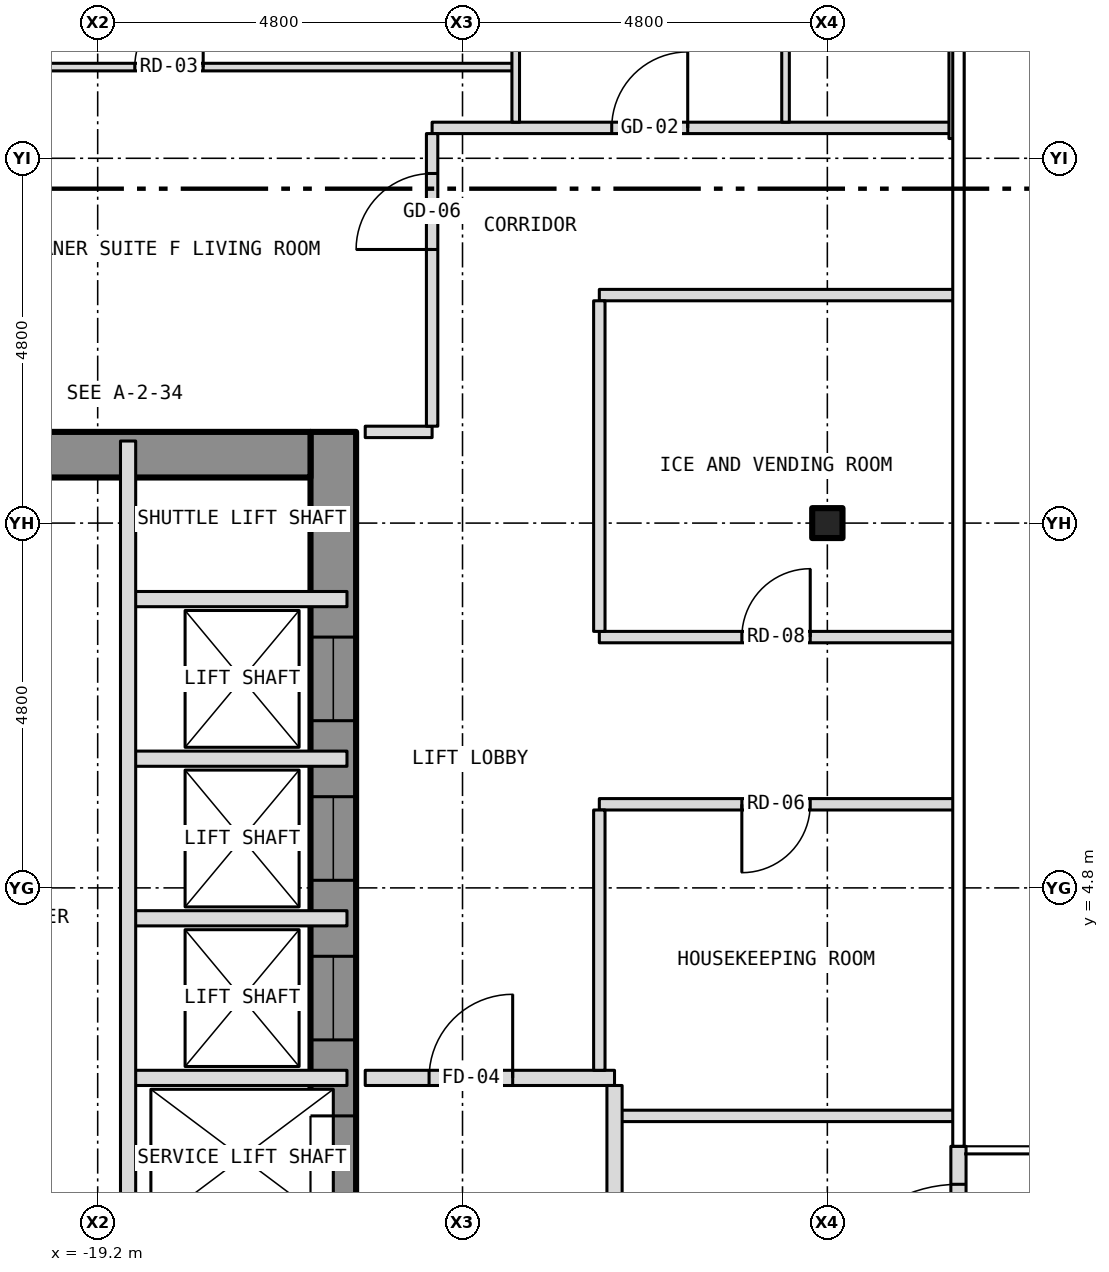
"""IFC4 building model, lengths in metres.
Left out: names, types, materials, properties, quantities, classifications, styles, units other than length and angle.
Written with IfcOpenShell. Run it as: python <this file> out.ifc"""

import sys

from ifc_helpers import new_model, si_unit, direction, frame, frame_2d, origin, origin_2d, place, context, subcontext, project, spatial, rectangle, i_section, extrude, element, fill, save


model = new_model("IFC4")
c1 = context("Model", 3, precision=1e-05, world=origin(), true_north=direction((0.0, 1.0)))
c2 = subcontext(c1, "Body", "Model", "MODEL_VIEW")
j1 = project(units=[si_unit("LENGTHUNIT", "METRE"), si_unit("PLANEANGLEUNIT", "RADIAN")], contexts=[c1])
p1 = place(None, origin())
s1 = spatial("IfcSite", under=j1, at=p1, CompositionType="ELEMENT")
p2 = place(p1, origin())
s2 = spatial("IfcBuilding", under=s1, at=p2, CompositionType="ELEMENT")
p3 = place(p2, frame((0.0, 0.0, 124.0)))
s3 = spatial("IfcBuildingStorey", under=s2, at=p3, CompositionType="ELEMENT", Elevation=124.0)
p4 = place(p3, frame((-9.6, 9.6, -0.15), z_axis=(0.0, 0.0, 1.0), x_axis=(1.0, 0.0, 0.0)))
e1 = element("IfcColumn", 1, at=p4, inside=s3, PredefinedType="COLUMN", context=c2, shape_type="SweptSolid", body=[
    extrude(i_section(OverallWidth=0.399, OverallDepth=0.394, WebThickness=0.023, FlangeThickness=0.037, at=origin_2d()), origin(), (0.0, 0.0, 1.0), 3.5),
])
p5 = place(p3, frame((-16.1, -10.8, 0.0), z_axis=(0.0, 0.0, 1.0), x_axis=(0.0, 1.0, 0.0)))
e2 = element("IfcWall", 2, at=p5, inside=s3, PredefinedType="SHEAR", context=c2, shape_type="SweptSolid", body=[
    extrude(rectangle(XDim=21.6, YDim=0.6, at=frame_2d((10.8, 0.0))), origin(), (0.0, 0.0, 1.0), 3.25),
])
p6 = place(p5, frame((9.4, 0.0, 0.0)))
e3 = element("IfcOpeningElement", 3, at=p6, cuts=e2, PredefinedType="OPENING", context=c2, shape_type="SweptSolid", body=[
    extrude(rectangle(XDim=1.1, YDim=2.1, at=frame_2d((0.55, 1.05))), frame((0.0, 0.312, 0.0), z_axis=(0.0, -1.0, 0.0), x_axis=(1.0, 0.0, 0.0)), (0.0, 0.0, 1.0), 0.624),
])
p7 = place(p5, frame((11.5, 0.0, 0.0)))
e4 = element("IfcOpeningElement", 4, at=p7, cuts=e2, PredefinedType="OPENING", context=c2, shape_type="SweptSolid", body=[
    extrude(rectangle(XDim=1.1, YDim=2.1, at=frame_2d((0.55, 1.05))), frame((0.0, 0.312, 0.0), z_axis=(0.0, -1.0, 0.0), x_axis=(1.0, 0.0, 0.0)), (0.0, 0.0, 1.0), 0.624),
])
p8 = place(p5, frame((13.6, 0.0, 0.0)))
e5 = element("IfcOpeningElement", 5, at=p8, cuts=e2, PredefinedType="OPENING", context=c2, shape_type="SweptSolid", body=[
    extrude(rectangle(XDim=1.1, YDim=2.1, at=frame_2d((0.55, 1.05))), frame((0.0, 0.312, 0.0), z_axis=(0.0, -1.0, 0.0), x_axis=(1.0, 0.0, 0.0)), (0.0, 0.0, 1.0), 0.624),
])
p9 = place(p5, frame((15.7, 0.0, 0.0)))
e6 = element("IfcOpeningElement", 6, at=p9, cuts=e2, PredefinedType="OPENING", context=c2, shape_type="SweptSolid", body=[
    extrude(rectangle(XDim=1.1, YDim=2.1, at=frame_2d((0.55, 1.05))), frame((0.0, 0.312, 0.0), z_axis=(0.0, -1.0, 0.0), x_axis=(1.0, 0.0, 0.0)), (0.0, 0.0, 1.0), 0.624),
])
p10 = place(p5, frame((17.8, 0.0, 0.0)))
e7 = element("IfcOpeningElement", 7, at=p10, cuts=e2, PredefinedType="OPENING", context=c2, shape_type="SweptSolid", body=[
    extrude(rectangle(XDim=1.1, YDim=2.1, at=frame_2d((0.55, 1.05))), frame((0.0, 0.312, 0.0), z_axis=(0.0, -1.0, 0.0), x_axis=(1.0, 0.0, 0.0)), (0.0, 0.0, 1.0), 0.624),
])
p11 = place(p5, frame((0.758, 0.0, 0.0)))
e8 = element("IfcOpeningElement", 8, at=p11, cuts=e2, PredefinedType="OPENING", context=c2, shape_type="SweptSolid", body=[
    extrude(rectangle(XDim=1.1, YDim=2.1, at=frame_2d((0.55, 1.05))), frame((0.0, 0.312, 0.0), z_axis=(0.0, -1.0, 0.0), x_axis=(1.0, 0.0, 0.0)), (0.0, 0.0, 1.0), 0.624),
])
p12 = place(p5, frame((7.5, 0.0, 0.0)))
e9 = element("IfcOpeningElement", 9, at=p12, cuts=e2, PredefinedType="OPENING", context=c2, shape_type="SweptSolid", body=[
    extrude(rectangle(XDim=1.1, YDim=2.1, at=frame_2d((0.55, 1.05))), frame((0.0, 0.312, 0.0), z_axis=(0.0, -1.0, 0.0), x_axis=(1.0, 0.0, 0.0)), (0.0, 0.0, 1.0), 0.624),
])
p13 = place(p3, frame((-22.2, 10.5, 0.0), z_axis=(0.0, 0.0, 1.0), x_axis=(1.0, 0.0, 0.0)))
e10 = element("IfcWall", 10, at=p13, inside=s3, PredefinedType="SHEAR", context=c2, shape_type="SweptSolid", body=[
    extrude(rectangle(XDim=5.8, YDim=0.6, at=frame_2d((2.9, 0.0))), origin(), (0.0, 0.0, 1.0), 3.25),
])
p14 = place(p3, frame((-7.875, -1.4, 0.0), z_axis=(0.0, 0.0, 1.0), x_axis=(0.0, 1.0, 0.0)))
e11 = element("IfcWall", 11, at=p14, inside=s3, PredefinedType="SOLIDWALL", context=c2, shape_type="SweptSolid", body=[
    extrude(rectangle(XDim=2.8, YDim=0.2, at=frame_2d((1.4, 0.0))), origin(), (0.0, 0.0, 1.0), 3.5),
])
p15 = place(p14, frame((0.5, 0.0, 0.0)))
e12 = element("IfcOpeningElement", 12, at=p15, cuts=e11, PredefinedType="OPENING", context=c2, shape_type="SweptSolid", body=[
    extrude(rectangle(XDim=1.8, YDim=2.1, at=frame_2d((0.9, 1.05))), frame((0.0, 0.112, 0.0), z_axis=(0.0, -1.0, 0.0), x_axis=(1.0, 0.0, 0.0)), (0.0, 0.0, 1.0), 0.224),
])
p16 = place(p3, frame((-12.4, 1.8, 0.0), z_axis=(0.0, 0.0, 1.0), x_axis=(1.0, 0.0, 0.0)))
e13 = element("IfcWall", 13, at=p16, inside=s3, PredefinedType="PARTITIONING", context=c2, shape_type="SweptSolid", body=[
    extrude(rectangle(XDim=4.48, YDim=0.15, at=frame_2d((2.24, 0.0))), origin(), (0.0, 0.0, 1.0), 3.35),
])
p17 = place(p3, frame((-18.8, 2.3, 0.0), z_axis=(0.0, 0.0, 1.0), x_axis=(1.0, 0.0, 0.0)))
e14 = element("IfcWall", 14, at=p17, inside=s3, PredefinedType="PARTITIONING", context=c2, shape_type="SweptSolid", body=[
    extrude(rectangle(XDim=2.88, YDim=0.2, at=frame_2d((1.44, 0.0))), origin(), (0.0, 0.0, 1.0), 3.25),
])
p18 = place(p3, frame((-15.68, 2.3, 0.0), z_axis=(0.0, 0.0, 1.0), x_axis=(1.0, 0.0, 0.0)))
e15 = element("IfcWall", 15, at=p18, inside=s3, PredefinedType="PARTITIONING", context=c2, shape_type="SweptSolid", body=[
    extrude(rectangle(XDim=3.28, YDim=0.2, at=frame_2d((1.64, 0.0))), origin(), (0.0, 0.0, 1.0), 3.35),
])
p19 = place(p18, frame((0.84, 0.0, 0.0)))
e16 = element("IfcOpeningElement", 16, at=p19, cuts=e15, PredefinedType="OPENING", context=c2, shape_type="SweptSolid", body=[
    extrude(rectangle(XDim=1.1, YDim=2.1, at=frame_2d((0.55, 1.05))), frame((0.0, 0.112, 0.0), z_axis=(0.0, -1.0, 0.0), x_axis=(1.0, 0.0, 0.0)), (0.0, 0.0, 1.0), 0.224),
])
p20 = place(p3, frame((-18.8, 4.4, 0.0), z_axis=(0.0, 0.0, 1.0), x_axis=(1.0, 0.0, 0.0)))
e17 = element("IfcWall", 17, at=p20, inside=s3, PredefinedType="PARTITIONING", context=c2, shape_type="SweptSolid", body=[
    extrude(rectangle(XDim=2.88, YDim=0.2, at=frame_2d((1.44, 0.0))), origin(), (0.0, 0.0, 1.0), 3.25),
])
p21 = place(p3, frame((-12.6, 5.9, 0.0), z_axis=(0.0, 0.0, 1.0), x_axis=(1.0, 0.0, 0.0)))
e18 = element("IfcWall", 18, at=p21, inside=s3, PredefinedType="PARTITIONING", context=c2, shape_type="SweptSolid", body=[
    extrude(rectangle(XDim=4.68, YDim=0.15, at=frame_2d((2.34, 0.0))), origin(), (0.0, 0.0, 1.0), 3.35),
])
p22 = place(p21, frame((1.875, 0.0, 0.0)))
e19 = element("IfcOpeningElement", 19, at=p22, cuts=e18, PredefinedType="OPENING", context=c2, shape_type="SweptSolid", body=[
    extrude(rectangle(XDim=0.9, YDim=2.1, at=frame_2d((0.45, 1.05))), frame((0.0, 0.087, 0.0), z_axis=(0.0, -1.0, 0.0), x_axis=(1.0, 0.0, 0.0)), (0.0, 0.0, 1.0), 0.174),
])
p23 = place(p3, frame((-18.8, 6.5, 0.0), z_axis=(0.0, 0.0, 1.0), x_axis=(1.0, 0.0, 0.0)))
e20 = element("IfcWall", 20, at=p23, inside=s3, PredefinedType="PARTITIONING", context=c2, shape_type="SweptSolid", body=[
    extrude(rectangle(XDim=2.88, YDim=0.2, at=frame_2d((1.44, 0.0))), origin(), (0.0, 0.0, 1.0), 3.25),
])
p24 = place(p3, frame((-12.6, 8.1, 0.0), z_axis=(0.0, 0.0, 1.0), x_axis=(1.0, 0.0, 0.0)))
e21 = element("IfcWall", 21, at=p24, inside=s3, PredefinedType="PARTITIONING", context=c2, shape_type="SweptSolid", body=[
    extrude(rectangle(XDim=4.68, YDim=0.15, at=frame_2d((2.34, 0.0))), origin(), (0.0, 0.0, 1.0), 3.35),
])
p25 = place(p24, frame((1.875, 0.0, 0.0)))
e22 = element("IfcOpeningElement", 22, at=p25, cuts=e21, PredefinedType="OPENING", context=c2, shape_type="SweptSolid", body=[
    extrude(rectangle(XDim=0.9, YDim=2.1, at=frame_2d((0.45, 1.05))), frame((0.0, 0.087, 0.0), z_axis=(0.0, -1.0, 0.0), x_axis=(1.0, 0.0, 0.0)), (0.0, 0.0, 1.0), 0.174),
])
p26 = place(p3, frame((-18.8, 8.6, 0.0), z_axis=(0.0, 0.0, 1.0), x_axis=(1.0, 0.0, 0.0)))
e23 = element("IfcWall", 23, at=p26, inside=s3, PredefinedType="PARTITIONING", context=c2, shape_type="SweptSolid", body=[
    extrude(rectangle(XDim=2.88, YDim=0.2, at=frame_2d((1.44, 0.0))), origin(), (0.0, 0.0, 1.0), 3.25),
])
p27 = place(p3, frame((-15.68, 10.8, 0.0), z_axis=(0.0, 0.0, 1.0), x_axis=(1.0, 0.0, 0.0)))
e24 = element("IfcWall", 24, at=p27, inside=s3, PredefinedType="PARTITIONING", context=c2, shape_type="SweptSolid", body=[
    extrude(rectangle(XDim=0.88, YDim=0.15, at=frame_2d((0.44, 0.0))), origin(), (0.0, 0.0, 1.0), 3.35),
])
p28 = place(p3, frame((-12.6, 12.6, 0.0), z_axis=(0.0, 0.0, 1.0), x_axis=(1.0, 0.0, 0.0)))
e25 = element("IfcWall", 25, at=p28, inside=s3, PredefinedType="PARTITIONING", context=c2, shape_type="SweptSolid", body=[
    extrude(rectangle(XDim=4.68, YDim=0.15, at=frame_2d((2.34, 0.0))), origin(), (0.0, 0.0, 1.0), 3.35),
])
p29 = place(p3, frame((-14.8, 14.8, 0.0), z_axis=(0.0, 0.0, 1.0), x_axis=(1.0, 0.0, 0.0)))
e26 = element("IfcWall", 26, at=p29, inside=s3, PredefinedType="PARTITIONING", context=c2, shape_type="SweptSolid", body=[
    extrude(rectangle(XDim=6.85, YDim=0.15, at=frame_2d((3.425, 0.0))), origin(), (0.0, 0.0, 1.0), 3.35),
])
p30 = place(p29, frame((2.363, 0.0, 0.0)))
e27 = element("IfcOpeningElement", 27, at=p30, cuts=e26, PredefinedType="OPENING", context=c2, shape_type="SweptSolid", body=[
    extrude(rectangle(XDim=1.0, YDim=2.1, at=frame_2d((0.5, 1.05))), frame((0.0, 0.087, 0.0), z_axis=(0.0, -1.0, 0.0), x_axis=(1.0, 0.0, 0.0)), (0.0, 0.0, 1.0), 0.174),
])
p31 = place(p3, frame((-23.28, 15.6, 0.0), z_axis=(0.0, 0.0, 1.0), x_axis=(1.0, 0.0, 0.0)))
e28 = element("IfcWall", 28, at=p31, inside=s3, PredefinedType="PARTITIONING", context=c2, shape_type="SweptSolid", body=[
    extrude(rectangle(XDim=9.58, YDim=0.1, at=frame_2d((4.79, 0.0))), origin(), (0.0, 0.0, 1.0), 3.35),
])
p32 = place(p31, frame((4.568, 0.0, 0.0)))
e29 = element("IfcOpeningElement", 29, at=p32, cuts=e28, PredefinedType="OPENING", context=c2, shape_type="SweptSolid", body=[
    extrude(rectangle(XDim=0.9, YDim=2.1, at=frame_2d((0.45, 1.05))), frame((0.0, 0.062, 0.0), z_axis=(0.0, -1.0, 0.0), x_axis=(1.0, 0.0, 0.0)), (0.0, 0.0, 1.0), 0.124),
])
p33 = place(p3, frame((-18.8, -1.8, 0.0), z_axis=(0.0, 0.0, 1.0), x_axis=(0.0, 1.0, 0.0)))
e30 = element("IfcWall", 30, at=p33, inside=s3, PredefinedType="PARTITIONING", context=c2, shape_type="SweptSolid", body=[
    extrude(rectangle(XDim=12.48, YDim=0.2, at=frame_2d((6.24, 0.0))), origin(), (0.0, 0.0, 1.0), 3.25),
])
p34 = place(p3, frame((-14.8, 10.875, 0.0), z_axis=(0.0, 0.0, 1.0), x_axis=(0.0, 1.0, 0.0)))
e31 = element("IfcWall", 31, at=p34, inside=s3, PredefinedType="PARTITIONING", context=c2, shape_type="SweptSolid", body=[
    extrude(rectangle(XDim=3.85, YDim=0.15, at=frame_2d((1.925, 0.0))), origin(), (0.0, 0.0, 1.0), 3.35),
])
p35 = place(p34, frame((2.325, 0.0, 0.0)))
e32 = element("IfcOpeningElement", 32, at=p35, cuts=e31, PredefinedType="OPENING", context=c2, shape_type="SweptSolid", body=[
    extrude(rectangle(XDim=1.0, YDim=2.1, at=frame_2d((0.5, 1.05))), frame((0.0, 0.087, 0.0), z_axis=(0.0, -1.0, 0.0), x_axis=(1.0, 0.0, 0.0)), (0.0, 0.0, 1.0), 0.174),
])
p36 = place(p3, frame((-13.7, 14.875, 0.0), z_axis=(0.0, 0.0, 1.0), x_axis=(0.0, 1.0, 0.0)))
e33 = element("IfcWall", 33, at=p36, inside=s3, PredefinedType="PARTITIONING", context=c2, shape_type="SweptSolid", body=[
    extrude(rectangle(XDim=7.805, YDim=0.1, at=frame_2d((3.902, 0.0))), origin(), (0.0, 0.0, 1.0), 3.35),
])
p37 = place(p3, frame((-12.6, 2.4, 0.0), z_axis=(0.0, 0.0, 1.0), x_axis=(0.0, 1.0, 0.0)))
e34 = element("IfcWall", 34, at=p37, inside=s3, PredefinedType="PARTITIONING", context=c2, shape_type="SweptSolid", body=[
    extrude(rectangle(XDim=3.425, YDim=0.15, at=frame_2d((1.712, 0.0))), origin(), (0.0, 0.0, 1.0), 3.35),
])
p38 = place(p3, frame((-12.6, 8.175, 0.0), z_axis=(0.0, 0.0, 1.0), x_axis=(0.0, 1.0, 0.0)))
e35 = element("IfcWall", 35, at=p38, inside=s3, PredefinedType="PARTITIONING", context=c2, shape_type="SweptSolid", body=[
    extrude(rectangle(XDim=4.35, YDim=0.15, at=frame_2d((2.175, 0.0))), origin(), (0.0, 0.0, 1.0), 3.35),
])
p39 = place(p3, frame((-12.4, -1.8, 0.0), z_axis=(0.0, 0.0, 1.0), x_axis=(0.0, 1.0, 0.0)))
e36 = element("IfcWall", 36, at=p39, inside=s3, PredefinedType="PARTITIONING", context=c2, shape_type="SweptSolid", body=[
    extrude(rectangle(XDim=4.0, YDim=0.2, at=frame_2d((2.0, 0.0))), origin(), (0.0, 0.0, 1.0), 3.35),
])
p40 = place(p39, frame((1.25, 0.0, 0.0)))
e37 = element("IfcOpeningElement", 37, at=p40, cuts=e36, PredefinedType="OPENING", context=c2, shape_type="SweptSolid", body=[
    extrude(rectangle(XDim=1.1, YDim=2.1, at=frame_2d((0.55, 1.05))), frame((0.0, 0.112, 0.0), z_axis=(0.0, -1.0, 0.0), x_axis=(1.0, 0.0, 0.0)), (0.0, 0.0, 1.0), 0.224),
])
p41 = place(p3, frame((-10.15, 14.875, 0.0), z_axis=(0.0, 0.0, 1.0), x_axis=(0.0, 1.0, 0.0)))
e38 = element("IfcWall", 38, at=p41, inside=s3, PredefinedType="PARTITIONING", context=c2, shape_type="SweptSolid", body=[
    extrude(rectangle(XDim=3.075, YDim=0.1, at=frame_2d((1.538, 0.0))), origin(), (0.0, 0.0, 1.0), 3.35),
])
p42 = place(p41, frame((1.971, 0.0, 0.0)))
e39 = element("IfcOpeningElement", 39, at=p42, cuts=e38, PredefinedType="OPENING", context=c2, shape_type="SweptSolid", body=[
    extrude(rectangle(XDim=0.9, YDim=2.1, at=frame_2d((0.45, 1.05))), frame((0.0, 0.062, 0.0), z_axis=(0.0, -1.0, 0.0), x_axis=(1.0, 0.0, 0.0)), (0.0, 0.0, 1.0), 0.124),
])
p43 = place(p3, frame((-7.95, 14.66, 0.0), z_axis=(0.0, 0.0, 1.0), x_axis=(0.0, 1.0, 0.0)))
e40 = element("IfcWall", 40, at=p43, inside=s3, PredefinedType="PARTITIONING", context=c2, shape_type="SweptSolid", body=[
    extrude(rectangle(XDim=3.48, YDim=0.1, at=frame_2d((1.74, 0.0))), origin(), (0.0, 0.0, 1.0), 2.733),
])
p44 = place(p15, origin())
e41 = element("IfcDoor", 41, at=p44, inside=s3, OperationType="DOUBLE_DOOR_DOUBLE_SWING", PredefinedType="DOOR", context=c2, shape_type="SweptSolid", body=[
    extrude(rectangle(XDim=1.8, YDim=2.1, at=frame_2d((0.9, 1.05))), frame((0.0, 0.025, 0.0), z_axis=(0.0, -1.0, 0.0), x_axis=(1.0, 0.0, 0.0)), (0.0, 0.0, 1.0), 0.05),
])
fill(e12, e41)
p45 = place(p7, origin())
e42 = element("IfcDoor", 42, at=p45, inside=s3, OperationType="SLIDING_TO_LEFT", PredefinedType="DOOR", context=c2, shape_type="SweptSolid", body=[
    extrude(rectangle(XDim=1.1, YDim=2.1, at=frame_2d((0.55, 1.05))), frame((0.0, 0.025, 0.0), z_axis=(0.0, -1.0, 0.0), x_axis=(1.0, 0.0, 0.0)), (0.0, 0.0, 1.0), 0.05),
])
fill(e4, e42)
p46 = place(p8, origin())
e43 = element("IfcDoor", 43, at=p46, inside=s3, OperationType="SLIDING_TO_LEFT", PredefinedType="DOOR", context=c2, shape_type="SweptSolid", body=[
    extrude(rectangle(XDim=1.1, YDim=2.1, at=frame_2d((0.55, 1.05))), frame((0.0, 0.025, 0.0), z_axis=(0.0, -1.0, 0.0), x_axis=(1.0, 0.0, 0.0)), (0.0, 0.0, 1.0), 0.05),
])
fill(e5, e43)
p47 = place(p9, origin())
e44 = element("IfcDoor", 44, at=p47, inside=s3, OperationType="SLIDING_TO_LEFT", PredefinedType="DOOR", context=c2, shape_type="SweptSolid", body=[
    extrude(rectangle(XDim=1.1, YDim=2.1, at=frame_2d((0.55, 1.05))), frame((0.0, 0.025, 0.0), z_axis=(0.0, -1.0, 0.0), x_axis=(1.0, 0.0, 0.0)), (0.0, 0.0, 1.0), 0.05),
])
fill(e6, e44)
p48 = place(p10, origin())
e45 = element("IfcDoor", 45, at=p48, inside=s3, OperationType="SLIDING_TO_LEFT", PredefinedType="DOOR", context=c2, shape_type="SweptSolid", body=[
    extrude(rectangle(XDim=1.1, YDim=2.1, at=frame_2d((0.55, 1.05))), frame((0.0, 0.025, 0.0), z_axis=(0.0, -1.0, 0.0), x_axis=(1.0, 0.0, 0.0)), (0.0, 0.0, 1.0), 0.05),
])
fill(e7, e45)
p49 = place(p19, origin())
e46 = element("IfcDoor", 46, at=p49, inside=s3, OperationType="SINGLE_SWING_RIGHT", PredefinedType="DOOR", context=c2, shape_type="SweptSolid", body=[
    extrude(rectangle(XDim=1.1, YDim=2.1, at=frame_2d((0.55, 1.05))), frame((0.0, 0.025, 0.0), z_axis=(0.0, -1.0, 0.0), x_axis=(1.0, 0.0, 0.0)), (0.0, 0.0, 1.0), 0.05),
])
fill(e16, e46)
p50 = place(p30, origin())
e47 = element("IfcDoor", 47, at=p50, inside=s3, OperationType="SINGLE_SWING_RIGHT", PredefinedType="DOOR", context=c2, shape_type="SweptSolid", body=[
    extrude(rectangle(XDim=1.0, YDim=2.1, at=frame_2d((0.5, 1.05))), frame((0.0, 0.025, 0.0), z_axis=(0.0, -1.0, 0.0), x_axis=(1.0, 0.0, 0.0)), (0.0, 0.0, 1.0), 0.05),
])
fill(e27, e47)
p51 = place(p35, origin())
e48 = element("IfcDoor", 48, at=p51, inside=s3, OperationType="SINGLE_SWING_LEFT", PredefinedType="DOOR", context=c2, shape_type="SweptSolid", body=[
    extrude(rectangle(XDim=1.0, YDim=2.1, at=frame_2d((0.5, 1.05))), frame((0.0, 0.025, 0.0), z_axis=(0.0, -1.0, 0.0), x_axis=(1.0, 0.0, 0.0)), (0.0, 0.0, 1.0), 0.05),
])
fill(e32, e48)
p52 = place(p32, origin())
e49 = element("IfcDoor", 49, at=p52, inside=s3, OperationType="SINGLE_SWING_RIGHT", PredefinedType="DOOR", context=c2, shape_type="SweptSolid", body=[
    extrude(rectangle(XDim=0.9, YDim=2.1, at=frame_2d((0.45, 1.05))), frame((0.0, 0.025, 0.0), z_axis=(0.0, -1.0, 0.0), x_axis=(1.0, 0.0, 0.0)), (0.0, 0.0, 1.0), 0.05),
])
fill(e29, e49)
p53 = place(p22, origin())
e50 = element("IfcDoor", 50, at=p53, inside=s3, OperationType="SINGLE_SWING_LEFT", PredefinedType="DOOR", context=c2, shape_type="SweptSolid", body=[
    extrude(rectangle(XDim=0.9, YDim=2.1, at=frame_2d((0.45, 1.05))), frame((0.0, 0.025, 0.0), z_axis=(0.0, -1.0, 0.0), x_axis=(1.0, 0.0, 0.0)), (0.0, 0.0, 1.0), 0.05),
])
fill(e19, e50)
p54 = place(p25, origin())
e51 = element("IfcDoor", 51, at=p54, inside=s3, OperationType="SINGLE_SWING_RIGHT", PredefinedType="DOOR", context=c2, shape_type="SweptSolid", body=[
    extrude(rectangle(XDim=0.9, YDim=2.1, at=frame_2d((0.45, 1.05))), frame((0.0, 0.025, 0.0), z_axis=(0.0, -1.0, 0.0), x_axis=(1.0, 0.0, 0.0)), (0.0, 0.0, 1.0), 0.05),
])
fill(e22, e51)
save(model, sys.argv[1])
